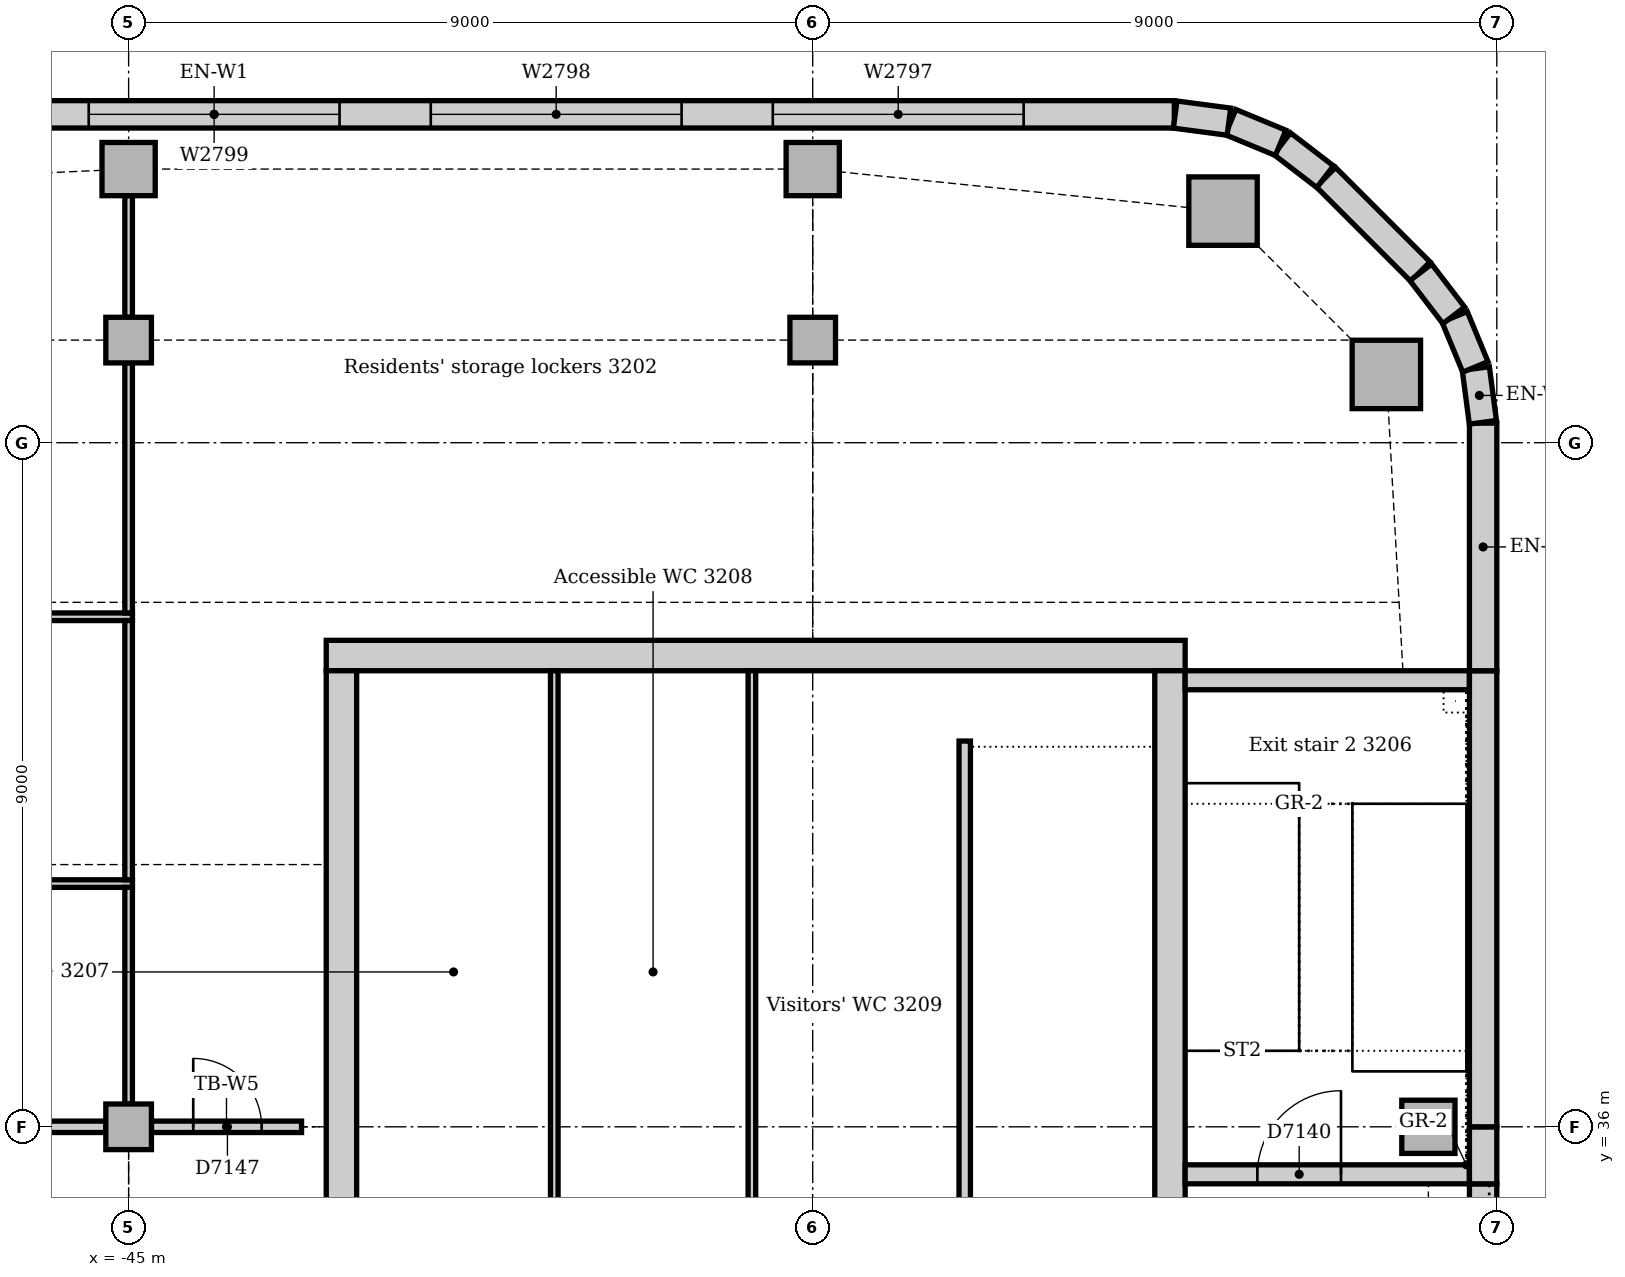
"""IFC4 building model, lengths in metres.
Left out: names, types, materials, properties, quantities, classifications, styles, units other than length and angle.
Written with IfcOpenShell. Run it as: python <this file> out.ifc"""

import sys

from ifc_helpers import new_model, si_unit, direction, frame, frame_2d, origin, origin_2d, place, context, subcontext, project, spatial, rectangle, extrude, element, fill, save


model = new_model("IFC4")
c1 = context("Model", 3, precision=1e-05, world=origin(), true_north=direction((0.0, 1.0)))
c2 = subcontext(c1, "Body", "Model", "MODEL_VIEW")
j1 = project(units=[si_unit("LENGTHUNIT", "METRE"), si_unit("PLANEANGLEUNIT", "RADIAN")], contexts=[c1])
p1 = place(None, origin())
s1 = spatial("IfcSite", under=j1, at=p1, CompositionType="ELEMENT")
p2 = place(p1, origin())
s2 = spatial("IfcBuilding", under=s1, at=p2, CompositionType="ELEMENT")
p3 = place(p2, frame((0.0, 0.0, 136.0)))
s3 = spatial("IfcBuildingStorey", under=s2, at=p3, CompositionType="ELEMENT", Elevation=136.0)
p4 = place(p3, frame((-31.1, 42.2, 0.0), z_axis=(0.0, 0.0, 1.0), x_axis=(-1.0, 0.0, 0.0)))
e1 = element("IfcWall", 1, at=p4, inside=s3, PredefinedType="SOLIDWALL", context=c2, shape_type="SweptSolid", body=[
    extrude(rectangle(XDim=11.3, YDim=0.4, at=frame_2d((5.65, 0.0))), origin(), (0.0, 0.0, 1.0), 4.0),
])
p5 = place(p3, frame((-31.3, 30.5, 0.0), z_axis=(0.0, 0.0, 1.0), x_axis=(0.0, 1.0, 0.0)))
e2 = element("IfcWall", 2, at=p5, inside=s3, PredefinedType="SOLIDWALL", context=c2, shape_type="SweptSolid", body=[
    extrude(rectangle(XDim=11.5, YDim=0.4, at=frame_2d((5.75, 0.0))), origin(), (0.0, 0.0, 1.0), 4.0),
])
p6 = place(p5, frame((0.85, 0.0, 0.0)))
e3 = element("IfcOpeningElement", 3, at=p6, cuts=e2, PredefinedType="OPENING", context=c2, shape_type="SweptSolid", body=[
    extrude(rectangle(XDim=1.8, YDim=2.1, at=frame_2d((0.9, 1.05))), frame((0.0, 0.21, 0.0), z_axis=(0.0, -1.0, 0.0), x_axis=(1.0, 0.0, 0.0)), (0.0, 0.0, 1.0), 0.42),
])
p7 = place(p3, frame((-42.2, 42.0, 0.0), z_axis=(0.0, 0.0, 1.0), x_axis=(0.0, -1.0, 0.0)))
e4 = element("IfcWall", 4, at=p7, inside=s3, PredefinedType="SOLIDWALL", context=c2, shape_type="SweptSolid", body=[
    extrude(rectangle(XDim=11.5, YDim=0.4, at=frame_2d((5.75, 0.0))), origin(), (0.0, 0.0, 1.0), 4.0),
])
p8 = place(p7, frame((8.85, 0.0, 0.0)))
e5 = element("IfcOpeningElement", 5, at=p8, cuts=e4, PredefinedType="OPENING", context=c2, shape_type="SweptSolid", body=[
    extrude(rectangle(XDim=1.8, YDim=2.1, at=frame_2d((0.9, 1.05))), frame((0.0, 0.21, 0.0), z_axis=(0.0, -1.0, 0.0), x_axis=(1.0, 0.0, 0.0)), (0.0, 0.0, 1.0), 0.42),
])
p9 = place(p3, frame((-31.1, 35.375, 0.0), z_axis=(0.0, 0.0, 1.0), x_axis=(1.0, 0.0, 0.0)))
e6 = element("IfcWall", 6, at=p9, inside=s3, PredefinedType="SOLIDWALL", context=c2, shape_type="SweptSolid", body=[
    extrude(rectangle(XDim=3.74, YDim=0.25, at=frame_2d((1.87, 0.0))), origin(), (0.0, 0.0, 1.0), 4.0),
])
p10 = place(p9, frame((0.95, 0.0, 0.0)))
e7 = element("IfcOpeningElement", 7, at=p10, cuts=e6, PredefinedType="OPENING", context=c2, shape_type="SweptSolid", body=[
    extrude(rectangle(XDim=1.1, YDim=2.1, at=frame_2d((0.55, 1.05))), frame((0.0, 0.135, 0.0), z_axis=(0.0, -1.0, 0.0), x_axis=(1.0, 0.0, 0.0)), (0.0, 0.0, 1.0), 0.27),
])
p11 = place(p3, frame((-27.36, 41.875, 0.0), z_axis=(0.0, 0.0, 1.0), x_axis=(-1.0, 0.0, 0.0)))
e8 = element("IfcWall", 8, at=p11, inside=s3, PredefinedType="SOLIDWALL", context=c2, shape_type="SweptSolid", body=[
    extrude(rectangle(XDim=3.74, YDim=0.25, at=frame_2d((1.87, 0.0))), origin(), (0.0, 0.0, 1.0), 4.0),
])
for number, where, z_axis, x_axis in (
    (9, (-28.453, 45.898, 0.0), (0.0, 0.0, 1.0), (1.0, 0.0, 0.0)),
    (10, (-30.602, 48.047, 0.0), (0.0, 0.0, 1.0), (1.0, 0.0, 0.0)),
):
    element("IfcColumn", number, at=place(p3, frame(where, z_axis=z_axis, x_axis=x_axis)), inside=s3, PredefinedType="COLUMN", context=c2, shape_type="SweptSolid", body=[
        extrude(rectangle(XDim=0.9, YDim=0.9, at=origin_2d()), origin(), (0.0, 0.0, 1.0), 3.85),
    ])
p12 = place(p3, frame((-27.9, 36.0, 0.0), z_axis=(0.0, 0.0, 1.0), x_axis=(1.0, 0.0, 0.0)))
e11 = element("IfcColumn", 11, at=p12, inside=s3, PredefinedType="COLUMN", context=c2, shape_type="SweptSolid", body=[
    extrude(rectangle(XDim=0.7, YDim=0.7, at=origin_2d()), origin(), (0.0, 0.0, 1.0), 4.0),
])
for number, where, z_axis, x_axis in (
    (12, (-45.0, 48.6, 0.0), (0.0, 0.0, 1.0), (1.0, 0.0, 0.0)),
    (13, (-36.0, 48.6, 0.0), (0.0, 0.0, 1.0), (1.0, 0.0, 0.0)),
):
    element("IfcColumn", number, at=place(p3, frame(where, z_axis=z_axis, x_axis=x_axis)), inside=s3, PredefinedType="COLUMN", context=c2, shape_type="SweptSolid", body=[
        extrude(rectangle(XDim=0.7, YDim=0.7, at=origin_2d()), origin(), (0.0, 0.0, 1.0), 3.85),
    ])
for number, where, z_axis, x_axis in (
    (14, (-45.0, 36.0, 0.0), (0.0, 0.0, 1.0), (1.0, 0.0, 0.0)),
    (15, (-45.0, 46.35, 0.0), (0.0, 0.0, 1.0), (1.0, 0.0, 0.0)),
    (16, (-36.0, 46.35, 0.0), (0.0, 0.0, 1.0), (1.0, 0.0, 0.0)),
):
    element("IfcColumn", number, at=place(p3, frame(where, z_axis=z_axis, x_axis=x_axis)), inside=s3, PredefinedType="COLUMN", context=c2, shape_type="SweptSolid", body=[
        extrude(rectangle(XDim=0.6, YDim=0.6, at=origin_2d()), origin(), (0.0, 0.0, 1.0), 3.85),
    ])
p13 = place(p3, frame((-27.18, 27.75, 0.0), z_axis=(0.0, 0.0, 1.0), x_axis=(0.0, 1.0, 0.0)))
e17 = element("IfcWall", 17, at=p13, inside=s3, PredefinedType="STANDARD", context=c2, shape_type="SweptSolid", body=[
    extrude(rectangle(XDim=7.5, YDim=0.36, at=frame_2d((3.75, 0.0))), origin(), (0.0, 0.0, 1.0), 3.436),
])
p14 = place(p13, frame((2.85, 0.0, 1.2)))
e18 = element("IfcOpeningElement", 18, at=p14, cuts=e17, PredefinedType="OPENING", context=c2, shape_type="SweptSolid", body=[
    extrude(rectangle(XDim=1.8, YDim=1.2, at=frame_2d((0.9, 0.6))), frame((0.0, 0.19, 0.0), z_axis=(0.0, -1.0, 0.0), x_axis=(1.0, 0.0, 0.0)), (0.0, 0.0, 1.0), 0.38),
])
p15 = place(p3, frame((-27.18, 35.25, 0.0), z_axis=(0.0, 0.0, 1.0), x_axis=(0.0, 1.0, 0.0)))
e19 = element("IfcWall", 19, at=p15, inside=s3, PredefinedType="STANDARD", context=c2, shape_type="SweptSolid", body=[
    extrude(rectangle(XDim=0.75, YDim=0.36, at=frame_2d((0.375, 0.0))), origin(), (0.0, 0.0, 1.0), 3.436),
])
p16 = place(p3, frame((-27.18, 36.0, 0.0), z_axis=(0.0, 0.0, 1.0), x_axis=(0.0, 1.0, 0.0)))
e20 = element("IfcWall", 20, at=p16, inside=s3, PredefinedType="STANDARD", context=c2, shape_type="SweptSolid", body=[
    extrude(rectangle(XDim=6.0, YDim=0.36, at=frame_2d((3.0, 0.0))), origin(), (0.0, 0.0, 1.0), 3.85),
])
p17 = place(p3, frame((-27.18, 42.0, 0.0), z_axis=(0.0, 0.0, 1.0), x_axis=(0.0, 1.0, 0.0)))
e21 = element("IfcWall", 21, at=p17, inside=s3, PredefinedType="STANDARD", context=c2, shape_type="SweptSolid", body=[
    extrude(rectangle(XDim=3.257, YDim=0.36, at=frame_2d((1.629, 0.0))), origin(), (0.0, 0.0, 1.0), 3.85),
])
p18 = place(p3, frame((-28.006, 47.251, 0.0), z_axis=(0.0, 0.0, 1.0), x_axis=(-0.707106781187, 0.707106781187, 0.0)))
e22 = element("IfcWall", 22, at=p18, inside=s3, PredefinedType="STANDARD", context=c2, shape_type="SweptSolid", body=[
    extrude(rectangle(XDim=1.757, YDim=0.36, at=frame_2d((0.879, 0.0))), origin(), (0.0, 0.0, 1.0), 3.85),
])
p19 = place(p3, frame((-31.243, 49.32, 0.0), z_axis=(0.0, 0.0, 1.0), x_axis=(-1.0, 0.0, 0.0)))
e23 = element("IfcWall", 23, at=p19, inside=s3, PredefinedType="STANDARD", context=c2, shape_type="SweptSolid", body=[
    extrude(rectangle(XDim=25.265, YDim=0.36, at=frame_2d((12.632, 0.0))), origin(), (0.0, 0.0, 1.0), 3.85),
])
p20 = place(p19, frame((1.982, 0.0, 0.9)))
e24 = element("IfcOpeningElement", 24, at=p20, cuts=e23, PredefinedType="OPENING", context=c2, shape_type="SweptSolid", body=[
    extrude(rectangle(XDim=3.3, YDim=1.6, at=frame_2d((1.65, 0.8))), frame((0.0, 0.19, 0.0), z_axis=(0.0, -1.0, 0.0), x_axis=(1.0, 0.0, 0.0)), (0.0, 0.0, 1.0), 0.38),
])
p21 = place(p19, frame((6.482, 0.0, 0.9)))
e25 = element("IfcOpeningElement", 25, at=p21, cuts=e23, PredefinedType="OPENING", context=c2, shape_type="SweptSolid", body=[
    extrude(rectangle(XDim=3.3, YDim=1.6, at=frame_2d((1.65, 0.8))), frame((0.0, 0.19, 0.0), z_axis=(0.0, -1.0, 0.0), x_axis=(1.0, 0.0, 0.0)), (0.0, 0.0, 1.0), 0.38),
])
p22 = place(p19, frame((10.982, 0.0, 0.9)))
e26 = element("IfcOpeningElement", 26, at=p22, cuts=e23, PredefinedType="OPENING", context=c2, shape_type="SweptSolid", body=[
    extrude(rectangle(XDim=3.3, YDim=1.6, at=frame_2d((1.65, 0.8))), frame((0.0, 0.19, 0.0), z_axis=(0.0, -1.0, 0.0), x_axis=(1.0, 0.0, 0.0)), (0.0, 0.0, 1.0), 0.38),
])
p23 = place(p19, frame((15.482, 0.0, 0.9)))
e27 = element("IfcOpeningElement", 27, at=p23, cuts=e23, PredefinedType="OPENING", context=c2, shape_type="SweptSolid", body=[
    extrude(rectangle(XDim=3.3, YDim=1.6, at=frame_2d((1.65, 0.8))), frame((0.0, 0.19, 0.0), z_axis=(0.0, -1.0, 0.0), x_axis=(1.0, 0.0, 0.0)), (0.0, 0.0, 1.0), 0.38),
])
p24 = place(p19, frame((19.982, 0.0, 0.9)))
e28 = element("IfcOpeningElement", 28, at=p24, cuts=e23, PredefinedType="OPENING", context=c2, shape_type="SweptSolid", body=[
    extrude(rectangle(XDim=3.3, YDim=1.6, at=frame_2d((1.65, 0.8))), frame((0.0, 0.19, 0.0), z_axis=(0.0, -1.0, 0.0), x_axis=(1.0, 0.0, 0.0)), (0.0, 0.0, 1.0), 0.38),
])
for number, where, z_axis, x_axis in (
    (29, (-27.183, 45.269, 0.0), (0.0, 0.0, 1.0), (-0.131, 0.991, 0.0)),
    (30, (-27.282, 45.997, 0.0), (0.0, 0.0, 1.0), (-0.383, 0.924, 0.0)),
):
    element("IfcWall", number, at=place(p3, frame(where, z_axis=z_axis, x_axis=x_axis)), inside=s3, PredefinedType="STANDARD", context=c2, shape_type="SweptSolid", body=[
        extrude(rectangle(XDim=0.713, YDim=0.36, at=frame_2d((0.356, 0.0))), origin(), (0.0, 0.0, 1.0), 3.85),
    ])
for number, where, z_axis, x_axis in (
    (31, (-27.566, 46.675, 0.0), (0.0, 0.0, 1.0), (-0.609, 0.793, 0.0)),
    (32, (-29.259, 48.5, 0.0), (0.0, 0.0, 1.0), (-0.793, 0.609, 0.0)),
):
    element("IfcWall", number, at=place(p3, frame(where, z_axis=z_axis, x_axis=x_axis)), inside=s3, PredefinedType="STANDARD", context=c2, shape_type="SweptSolid", body=[
        extrude(rectangle(XDim=0.713, YDim=0.36, at=frame_2d((0.357, 0.0))), origin(), (0.0, 0.0, 1.0), 3.85),
    ])
for number, where, z_axis, x_axis in (
    (33, (-29.844, 48.945, 0.0), (0.0, 0.0, 1.0), (-0.924, 0.383, 0.0)),
    (34, (-30.524, 49.224, 0.0), (0.0, 0.0, 1.0), (-0.991, 0.131, 0.0)),
):
    element("IfcWall", number, at=place(p3, frame(where, z_axis=z_axis, x_axis=x_axis)), inside=s3, PredefinedType="STANDARD", context=c2, shape_type="SweptSolid", body=[
        extrude(rectangle(XDim=0.713, YDim=0.36, at=frame_2d((0.356, 0.0))), origin(), (0.0, 0.0, 1.0), 3.85),
    ])
p25 = place(p3, frame((-34.0, 41.075, 0.0), z_axis=(0.0, 0.0, 1.0), x_axis=(0.0, -1.0, 0.0)))
e35 = element("IfcWall", 35, at=p25, inside=s3, PredefinedType="SOLIDWALL", context=c2, shape_type="SweptSolid", body=[
    extrude(rectangle(XDim=7.0, YDim=0.15, at=frame_2d((3.5, 0.0))), origin(), (0.0, 0.0, 1.0), 4.0),
])
for number, where, z_axis, x_axis in (
    (36, (-39.4, 34.075, 0.0), (0.0, 0.0, 1.0), (0.0, 1.0, 0.0)),
    (37, (-36.8, 34.075, 0.0), (0.0, 0.0, 1.0), (0.0, 1.0, 0.0)),
):
    element("IfcWall", number, at=place(p3, frame(where, z_axis=z_axis, x_axis=x_axis)), inside=s3, PredefinedType="PARTITIONING", context=c2, shape_type="SweptSolid", body=[
        extrude(rectangle(XDim=7.925, YDim=0.1, at=frame_2d((3.962, 0.0))), origin(), (0.0, 0.0, 1.0), 3.85),
    ])
p26 = place(p3, frame((-44.7, 36.0, 0.0), z_axis=(0.0, 0.0, 1.0), x_axis=(1.0, 0.0, 0.0)))
e38 = element("IfcWall", 38, at=p26, inside=s3, PredefinedType="PARTITIONING", context=c2, shape_type="SweptSolid", body=[
    extrude(rectangle(XDim=1.975, YDim=0.15, at=frame_2d((0.988, 0.0))), origin(), (0.0, 0.0, 1.0), 3.602),
])
p27 = place(p26, frame((0.55, 0.0, 0.0)))
e39 = element("IfcOpeningElement", 39, at=p27, cuts=e38, PredefinedType="OPENING", context=c2, shape_type="SweptSolid", body=[
    extrude(rectangle(XDim=0.9, YDim=2.1, at=frame_2d((0.45, 1.05))), frame((0.0, 0.085, 0.0), z_axis=(0.0, -1.0, 0.0), x_axis=(1.0, 0.0, 0.0)), (0.0, 0.0, 1.0), 0.17),
])
p28 = place(p3, frame((-53.7, 36.0, 0.0), z_axis=(0.0, 0.0, 1.0), x_axis=(1.0, 0.0, 0.0)))
e40 = element("IfcWall", 40, at=p28, inside=s3, PredefinedType="PARTITIONING", context=c2, shape_type="SweptSolid", body=[
    extrude(rectangle(XDim=8.4, YDim=0.15, at=frame_2d((4.2, 0.0))), origin(), (0.0, 0.0, 1.0), 3.262),
])
p29 = place(p28, frame((0.3, 0.0, 0.0)))
e41 = element("IfcOpeningElement", 41, at=p29, cuts=e40, PredefinedType="OPENING", context=c2, shape_type="SweptSolid", body=[
    extrude(rectangle(XDim=1.0, YDim=2.1, at=frame_2d((0.5, 1.05))), frame((0.0, 0.085, 0.0), z_axis=(0.0, -1.0, 0.0), x_axis=(1.0, 0.0, 0.0)), (0.0, 0.0, 1.0), 0.17),
])
p30 = place(p3, frame((-60.39, 39.2, 0.0), z_axis=(0.0, 0.0, 1.0), x_axis=(1.0, 0.0, 0.0)))
e42 = element("IfcWall", 42, at=p30, inside=s3, PredefinedType="PARTITIONING", context=c2, shape_type="SweptSolid", body=[
    extrude(rectangle(XDim=15.44, YDim=0.1, at=frame_2d((7.72, 0.0))), origin(), (0.0, 0.0, 1.0), 3.85),
])
p31 = place(p30, frame((6.021, 0.0, 0.0)))
e43 = element("IfcOpeningElement", 43, at=p31, cuts=e42, PredefinedType="OPENING", context=c2, shape_type="SweptSolid", body=[
    extrude(rectangle(XDim=0.9, YDim=2.1, at=frame_2d((0.45, 1.05))), frame((0.0, 0.06, 0.0), z_axis=(0.0, -1.0, 0.0), x_axis=(1.0, 0.0, 0.0)), (0.0, 0.0, 1.0), 0.12),
])
p32 = place(p3, frame((-60.39, 42.71, 0.0), z_axis=(0.0, 0.0, 1.0), x_axis=(1.0, 0.0, 0.0)))
e44 = element("IfcWall", 44, at=p32, inside=s3, PredefinedType="PARTITIONING", context=c2, shape_type="SweptSolid", body=[
    extrude(rectangle(XDim=15.44, YDim=0.1, at=frame_2d((7.72, 0.0))), origin(), (0.0, 0.0, 1.0), 3.85),
])
p33 = place(p32, frame((4.5, 0.0, 0.0)))
e45 = element("IfcOpeningElement", 45, at=p33, cuts=e44, PredefinedType="OPENING", context=c2, shape_type="SweptSolid", body=[
    extrude(rectangle(XDim=0.9, YDim=2.1, at=frame_2d((0.45, 1.05))), frame((0.0, 0.06, 0.0), z_axis=(0.0, -1.0, 0.0), x_axis=(1.0, 0.0, 0.0)), (0.0, 0.0, 1.0), 0.12),
])
p34 = place(p32, frame((12.06, 0.0, 0.0)))
e46 = element("IfcOpeningElement", 46, at=p34, cuts=e44, PredefinedType="OPENING", context=c2, shape_type="SweptSolid", body=[
    extrude(rectangle(XDim=0.9, YDim=2.1, at=frame_2d((0.45, 1.05))), frame((0.0, 0.06, 0.0), z_axis=(0.0, -1.0, 0.0), x_axis=(1.0, 0.0, 0.0)), (0.0, 0.0, 1.0), 0.12),
])
p35 = place(p3, frame((-45.0, 42.76, 0.0), z_axis=(0.0, 0.0, 1.0), x_axis=(0.0, 1.0, 0.0)))
e47 = element("IfcWall", 47, at=p35, inside=s3, PredefinedType="PARTITIONING", context=c2, shape_type="SweptSolid", body=[
    extrude(rectangle(XDim=3.29, YDim=0.1, at=frame_2d((1.645, 0.0))), origin(), (0.0, 0.0, 1.0), 3.362),
])
p36 = place(p3, frame((-45.0, 39.25, 0.0), z_axis=(0.0, 0.0, 1.0), x_axis=(0.0, 1.0, 0.0)))
e48 = element("IfcWall", 48, at=p36, inside=s3, PredefinedType="PARTITIONING", context=c2, shape_type="SweptSolid", body=[
    extrude(rectangle(XDim=3.41, YDim=0.1, at=frame_2d((1.705, 0.0))), origin(), (0.0, 0.0, 1.0), 3.362),
])
p37 = place(p3, frame((-45.0, 36.3, 0.0), z_axis=(0.0, 0.0, 1.0), x_axis=(0.0, 1.0, 0.0)))
e49 = element("IfcWall", 49, at=p37, inside=s3, PredefinedType="PARTITIONING", context=c2, shape_type="SweptSolid", body=[
    extrude(rectangle(XDim=2.85, YDim=0.1, at=frame_2d((1.425, 0.0))), origin(), (0.0, 0.0, 1.0), 3.362),
])
p38 = place(p3, frame((-45.0, 46.65, 0.0), z_axis=(0.0, 0.0, 1.0), x_axis=(0.0, 1.0, 0.0)))
e50 = element("IfcWall", 50, at=p38, inside=s3, PredefinedType="PARTITIONING", context=c2, shape_type="SweptSolid", body=[
    extrude(rectangle(XDim=1.6, YDim=0.1, at=frame_2d((0.8, 0.0))), origin(), (0.0, 0.0, 1.0), 3.652),
])
p39 = place(p20, origin())
e51 = element("IfcWindow", 51, at=p39, inside=s3, PartitioningType="SINGLE_PANEL", PredefinedType="WINDOW", context=c2, shape_type="SweptSolid", body=[
    extrude(rectangle(XDim=3.3, YDim=1.6, at=frame_2d((1.65, 0.8))), frame((0.0, 0.13, 0.0), z_axis=(0.0, -1.0, 0.0), x_axis=(1.0, 0.0, 0.0)), (0.0, 0.0, 1.0), 0.06),
])
fill(e24, e51)
p40 = place(p21, origin())
e52 = element("IfcWindow", 52, at=p40, inside=s3, PartitioningType="SINGLE_PANEL", PredefinedType="WINDOW", context=c2, shape_type="SweptSolid", body=[
    extrude(rectangle(XDim=3.3, YDim=1.6, at=frame_2d((1.65, 0.8))), frame((0.0, 0.13, 0.0), z_axis=(0.0, -1.0, 0.0), x_axis=(1.0, 0.0, 0.0)), (0.0, 0.0, 1.0), 0.06),
])
fill(e25, e52)
p41 = place(p22, origin())
e53 = element("IfcWindow", 53, at=p41, inside=s3, PartitioningType="SINGLE_PANEL", PredefinedType="WINDOW", context=c2, shape_type="SweptSolid", body=[
    extrude(rectangle(XDim=3.3, YDim=1.6, at=frame_2d((1.65, 0.8))), frame((0.0, 0.13, 0.0), z_axis=(0.0, -1.0, 0.0), x_axis=(1.0, 0.0, 0.0)), (0.0, 0.0, 1.0), 0.06),
])
fill(e26, e53)
p42 = place(p10, origin())
e54 = element("IfcDoor", 54, at=p42, inside=s3, OperationType="SINGLE_SWING_RIGHT", PredefinedType="DOOR", context=c2, shape_type="SweptSolid", body=[
    extrude(rectangle(XDim=1.1, YDim=2.1, at=frame_2d((0.55, 1.05))), frame((0.0, 0.025, 0.0), z_axis=(0.0, -1.0, 0.0), x_axis=(1.0, 0.0, 0.0)), (0.0, 0.0, 1.0), 0.05),
])
fill(e7, e54)
p43 = place(p27, origin())
e55 = element("IfcDoor", 55, at=p43, inside=s3, OperationType="SINGLE_SWING_LEFT", PredefinedType="DOOR", context=c2, shape_type="SweptSolid", body=[
    extrude(rectangle(XDim=0.9, YDim=2.1, at=frame_2d((0.45, 1.05))), frame((0.0, 0.025, 0.0), z_axis=(0.0, -1.0, 0.0), x_axis=(1.0, 0.0, 0.0)), (0.0, 0.0, 1.0), 0.05),
])
fill(e39, e55)
save(model, sys.argv[1])
